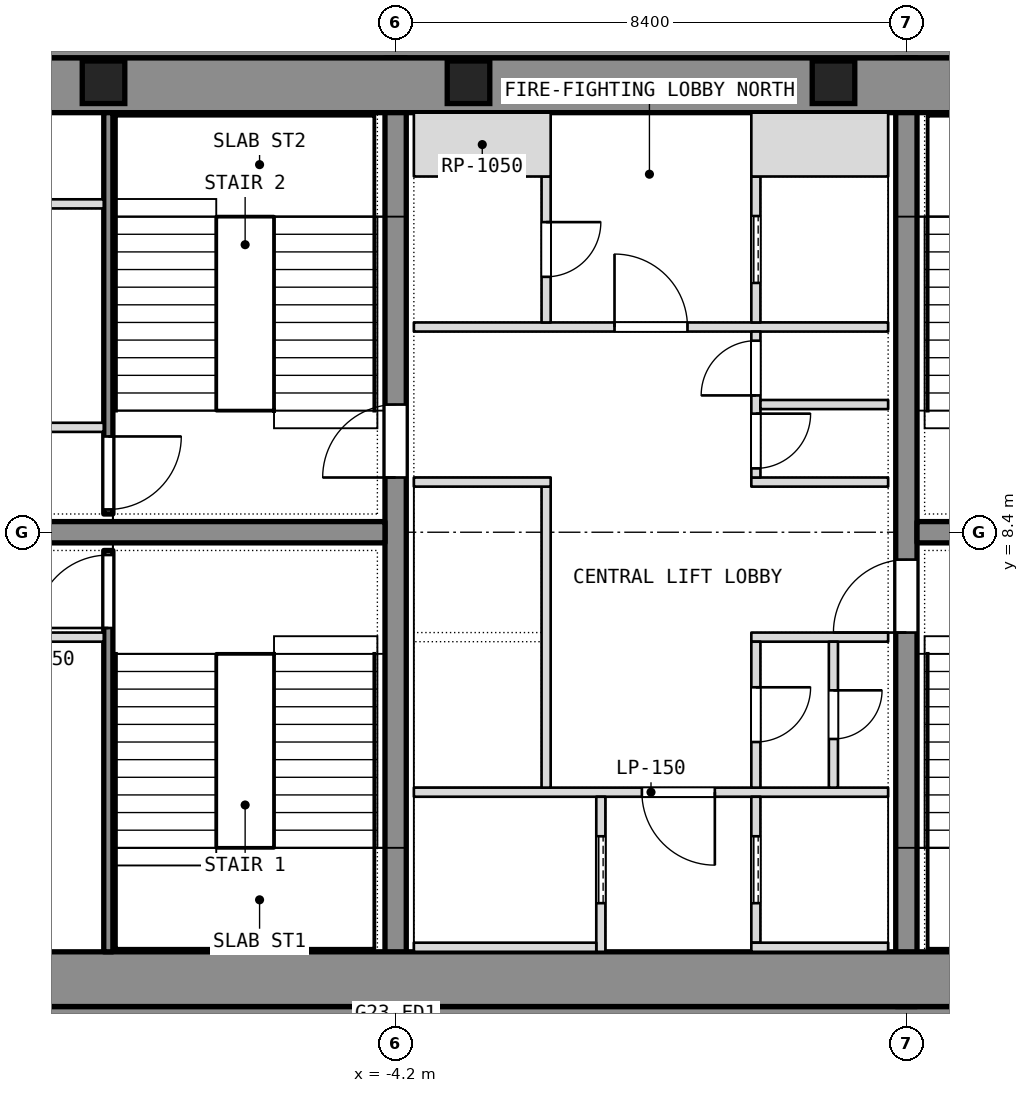
"""IFC4 building model, lengths in metres.
Left out: names, types, materials, properties, quantities, classifications, styles, units other than length and angle.
Written with IfcOpenShell. Run it as: python <this file> out.ifc"""

import sys

from ifc_helpers import new_model, si_unit, direction, frame, frame_2d, origin, origin_2d, place, context, subcontext, project, spatial, rectangle, extrude, element, fill, save


model = new_model("IFC4")
c1 = context("Model", 3, precision=1e-05, world=origin(), true_north=direction((0.0, 1.0)))
c2 = subcontext(c1, "Body", "Model", "MODEL_VIEW")
j1 = project(units=[si_unit("LENGTHUNIT", "METRE"), si_unit("PLANEANGLEUNIT", "RADIAN")], contexts=[c1])
p1 = place(None, origin())
s1 = spatial("IfcSite", under=j1, at=p1, CompositionType="ELEMENT")
p2 = place(p1, origin())
s2 = spatial("IfcBuilding", under=s1, at=p2, CompositionType="ELEMENT")
p3 = place(p2, frame((0.0, 0.0, 274.1)))
s3 = spatial("IfcBuildingStorey", under=s2, at=p3, CompositionType="ELEMENT", Elevation=274.1)
for number, where, z_axis, x_axis in (
    (1, (-11.1, 0.3, 0.0), (0.0, 0.0, 1.0), (1.0, 0.0, 0.0)),
    (2, (-11.1, 16.5, 0.0), (0.0, 0.0, 1.0), (1.0, 0.0, 0.0)),
):
    element("IfcWall", number, at=place(p3, frame(where, z_axis=z_axis, x_axis=x_axis)), inside=s3, PredefinedType="SHEAR", context=c2, shape_type="SweptSolid", body=[
        extrude(rectangle(XDim=22.2, YDim=0.6, at=frame_2d((11.1, 0.0))), origin(), (0.0, 0.0, 1.0), 3.6),
    ])
p4 = place(p3, frame((-4.2, 0.6, 0.0), z_axis=(0.0, 0.0, 1.0), x_axis=(0.0, 1.0, 0.0)))
e3 = element("IfcWall", 3, at=p4, inside=s3, PredefinedType="SHEAR", context=c2, shape_type="SweptSolid", body=[
    extrude(rectangle(XDim=15.6, YDim=0.35, at=frame_2d((7.8, 0.0))), origin(), (0.0, 0.0, 1.0), 3.6),
])
p5 = place(p4, frame((8.7, 0.0, 0.0)))
e4 = element("IfcOpeningElement", 4, at=p5, cuts=e3, PredefinedType="OPENING", context=c2, shape_type="SweptSolid", body=[
    extrude(rectangle(XDim=1.2, YDim=2.1, at=frame_2d((0.6, 1.05))), frame((0.0, 0.175, 0.0), z_axis=(0.0, -1.0, 0.0), x_axis=(1.0, 0.0, 0.0)), (0.0, 0.0, 1.0), 0.35),
])
p6 = place(p3, frame((4.2, 0.6, 0.0), z_axis=(0.0, 0.0, 1.0), x_axis=(0.0, 1.0, 0.0)))
e5 = element("IfcWall", 5, at=p6, inside=s3, PredefinedType="SHEAR", context=c2, shape_type="SweptSolid", body=[
    extrude(rectangle(XDim=15.6, YDim=0.35, at=frame_2d((7.8, 0.0))), origin(), (0.0, 0.0, 1.0), 3.6),
])
p7 = place(p6, frame((6.15, 0.0, 0.0)))
e6 = element("IfcOpeningElement", 6, at=p7, cuts=e5, PredefinedType="OPENING", context=c2, shape_type="SweptSolid", body=[
    extrude(rectangle(XDim=1.2, YDim=2.1, at=frame_2d((0.6, 1.05))), frame((0.0, 0.175, 0.0), z_axis=(0.0, -1.0, 0.0), x_axis=(1.0, 0.0, 0.0)), (0.0, 0.0, 1.0), 0.35),
])
for number, where, z_axis, x_axis in (
    (7, (-11.1, 8.4, 0.0), (0.0, 0.0, 1.0), (1.0, 0.0, 0.0)),
    (8, (4.375, 8.4, 0.0), (0.0, 0.0, 1.0), (1.0, 0.0, 0.0)),
):
    element("IfcWall", number, at=place(p3, frame(where, z_axis=z_axis, x_axis=x_axis)), inside=s3, PredefinedType="SHEAR", context=c2, shape_type="SweptSolid", body=[
        extrude(rectangle(XDim=6.725, YDim=0.35, at=frame_2d((3.363, 0.0))), origin(), (0.0, 0.0, 1.0), 3.6),
    ])
for number, where, z_axis, x_axis in (
    (9, (-9.004, 15.8, 0.0), (0.0, 0.0, 1.0), (1.0, 0.0, 0.0)),
    (10, (-3.001, 15.8, 0.0), (0.0, 0.0, 1.0), (1.0, 0.0, 0.0)),
    (11, (3.001, 15.8, 0.0), (0.0, 0.0, 1.0), (1.0, 0.0, 0.0)),
):
    element("IfcColumn", number, at=place(p3, frame(where, z_axis=z_axis, x_axis=x_axis)), inside=s3, PredefinedType="COLUMN", context=c2, shape_type="SweptSolid", body=[
        extrude(rectangle(XDim=0.7, YDim=0.7, at=origin_2d()), origin(), (0.0, 0.0, 1.0), 3.6),
    ])
for number, where, z_axis, x_axis in (
    (12, (-11.1, 1.05, 0.0), (0.0, 0.0, 1.0), (1.0, 0.0, 0.0)),
    (13, (-11.1, 15.75, 0.0), (0.0, 0.0, 1.0), (1.0, 0.0, 0.0)),
):
    element("IfcWall", number, at=place(p3, frame(where, z_axis=z_axis, x_axis=x_axis)), inside=s3, PredefinedType="PARTITIONING", context=c2, shape_type="SweptSolid", body=[
        extrude(rectangle(XDim=22.2, YDim=0.9, at=frame_2d((11.1, 0.0))), origin(), (0.0, 0.0, 1.0), 3.34),
    ])
p8 = place(p3, frame((-8.925, 1.5, 0.0), z_axis=(0.0, 0.0, 1.0), x_axis=(0.0, 1.0, 0.0)))
e14 = element("IfcWall", 14, at=p8, inside=s3, PredefinedType="SHEAR", context=c2, shape_type="SweptSolid", body=[
    extrude(rectangle(XDim=6.6, YDim=0.15, at=frame_2d((3.3, 0.0))), origin(), (0.0, 0.0, 1.0), 3.34),
])
p9 = place(p8, frame((5.325, 0.0, 0.0)))
e15 = element("IfcOpeningElement", 15, at=p9, cuts=e14, PredefinedType="OPENING", context=c2, shape_type="SweptSolid", body=[
    extrude(rectangle(XDim=1.2, YDim=2.1, at=frame_2d((0.6, 1.05))), frame((0.0, 0.075, 0.0), z_axis=(0.0, -1.0, 0.0), x_axis=(1.0, 0.0, 0.0)), (0.0, 0.0, 1.0), 0.15),
])
p10 = place(p3, frame((-11.1, 6.675, 0.0), z_axis=(0.0, 0.0, 1.0), x_axis=(1.0, 0.0, 0.0)))
e16 = element("IfcWall", 16, at=p10, inside=s3, PredefinedType="PARTITIONING", context=c2, shape_type="SweptSolid", body=[
    extrude(rectangle(XDim=2.1, YDim=0.15, at=frame_2d((1.05, 0.0))), origin(), (0.0, 0.0, 1.0), 3.34),
])
p11 = place(p3, frame((-8.925, 8.7, 0.0), z_axis=(0.0, 0.0, 1.0), x_axis=(0.0, 1.0, 0.0)))
e17 = element("IfcWall", 17, at=p11, inside=s3, PredefinedType="SHEAR", context=c2, shape_type="SweptSolid", body=[
    extrude(rectangle(XDim=6.6, YDim=0.15, at=frame_2d((3.3, 0.0))), origin(), (0.0, 0.0, 1.0), 3.34),
])
p12 = place(p11, frame((0.075, 0.0, 0.0)))
e18 = element("IfcOpeningElement", 18, at=p12, cuts=e17, PredefinedType="OPENING", context=c2, shape_type="SweptSolid", body=[
    extrude(rectangle(XDim=1.2, YDim=2.1, at=frame_2d((0.6, 1.05))), frame((0.0, 0.075, 0.0), z_axis=(0.0, -1.0, 0.0), x_axis=(1.0, 0.0, 0.0)), (0.0, 0.0, 1.0), 0.15),
])
for number, where, z_axis, x_axis in (
    (19, (-11.1, 10.125, 0.0), (0.0, 0.0, 1.0), (1.0, 0.0, 0.0)),
    (20, (-11.1, 13.8, 0.0), (0.0, 0.0, 1.0), (1.0, 0.0, 0.0)),
):
    element("IfcWall", number, at=place(p3, frame(where, z_axis=z_axis, x_axis=x_axis)), inside=s3, PredefinedType="PARTITIONING", context=c2, shape_type="SweptSolid", body=[
        extrude(rectangle(XDim=2.1, YDim=0.15, at=frame_2d((1.05, 0.0))), origin(), (0.0, 0.0, 1.0), 3.34),
    ])
p13 = place(p3, frame((-3.9, 4.125, 0.0), z_axis=(0.0, 0.0, 1.0), x_axis=(1.0, 0.0, 0.0)))
e21 = element("IfcWall", 21, at=p13, inside=s3, PredefinedType="PARTITIONING", context=c2, shape_type="SweptSolid", body=[
    extrude(rectangle(XDim=7.8, YDim=0.15, at=frame_2d((3.9, 0.0))), origin(), (0.0, 0.0, 1.0), 3.34),
])
p14 = place(p13, frame((3.75, 0.0, 0.0)))
e22 = element("IfcOpeningElement", 22, at=p14, cuts=e21, PredefinedType="OPENING", context=c2, shape_type="SweptSolid", body=[
    extrude(rectangle(XDim=1.2, YDim=2.1, at=frame_2d((0.6, 1.05))), frame((0.0, 0.075, 0.0), z_axis=(0.0, -1.0, 0.0), x_axis=(1.0, 0.0, 0.0)), (0.0, 0.0, 1.0), 0.15),
])
p15 = place(p3, frame((-3.9, 11.775, 0.0), z_axis=(0.0, 0.0, 1.0), x_axis=(1.0, 0.0, 0.0)))
e23 = element("IfcWall", 23, at=p15, inside=s3, PredefinedType="PARTITIONING", context=c2, shape_type="SweptSolid", body=[
    extrude(rectangle(XDim=7.8, YDim=0.15, at=frame_2d((3.9, 0.0))), origin(), (0.0, 0.0, 1.0), 3.34),
])
p16 = place(p15, frame((3.3, 0.0, 0.0)))
e24 = element("IfcOpeningElement", 24, at=p16, cuts=e23, PredefinedType="OPENING", context=c2, shape_type="SweptSolid", body=[
    extrude(rectangle(XDim=1.2, YDim=2.1, at=frame_2d((0.6, 1.05))), frame((0.0, 0.075, 0.0), z_axis=(0.0, -1.0, 0.0), x_axis=(1.0, 0.0, 0.0)), (0.0, 0.0, 1.0), 0.15),
])
p17 = place(p3, frame((-0.825, 1.5, 0.0), z_axis=(0.0, 0.0, 1.0), x_axis=(0.0, 1.0, 0.0)))
e25 = element("IfcWall", 25, at=p17, inside=s3, PredefinedType="SHEAR", context=c2, shape_type="SweptSolid", body=[
    extrude(rectangle(XDim=2.55, YDim=0.15, at=frame_2d((1.275, 0.0))), origin(), (0.0, 0.0, 1.0), 3.6),
])
p18 = place(p17, frame((0.8, 0.0, 0.0)))
e26 = element("IfcOpeningElement", 26, at=p18, cuts=e25, PredefinedType="OPENING", context=c2, shape_type="SweptSolid", body=[
    extrude(rectangle(XDim=1.1, YDim=2.1, at=frame_2d((0.55, 1.05))), frame((0.0, 0.075, 0.0), z_axis=(0.0, -1.0, 0.0), x_axis=(1.0, 0.0, 0.0)), (0.0, 0.0, 1.0), 0.15),
])
p19 = place(p3, frame((-3.9, 1.575, 0.0), z_axis=(0.0, 0.0, 1.0), x_axis=(1.0, 0.0, 0.0)))
e27 = element("IfcWall", 27, at=p19, inside=s3, PredefinedType="SHEAR", context=c2, shape_type="SweptSolid", body=[
    extrude(rectangle(XDim=3.0, YDim=0.15, at=frame_2d((1.5, 0.0))), origin(), (0.0, 0.0, 1.0), 3.6),
])
p20 = place(p3, frame((-1.725, 4.2, 0.0), z_axis=(0.0, 0.0, 1.0), x_axis=(0.0, 1.0, 0.0)))
e28 = element("IfcWall", 28, at=p20, inside=s3, PredefinedType="SHEAR", context=c2, shape_type="SweptSolid", body=[
    extrude(rectangle(XDim=4.95, YDim=0.15, at=frame_2d((2.475, 0.0))), origin(), (0.0, 0.0, 1.0), 3.6),
])
p21 = place(p3, frame((-3.9, 9.225, 0.0), z_axis=(0.0, 0.0, 1.0), x_axis=(1.0, 0.0, 0.0)))
e29 = element("IfcWall", 29, at=p21, inside=s3, PredefinedType="SHEAR", context=c2, shape_type="SweptSolid", body=[
    extrude(rectangle(XDim=2.25, YDim=0.15, at=frame_2d((1.125, 0.0))), origin(), (0.0, 0.0, 1.0), 3.6),
])
p22 = place(p3, frame((-1.725, 11.85, 0.0), z_axis=(0.0, 0.0, 1.0), x_axis=(0.0, 1.0, 0.0)))
e30 = element("IfcWall", 30, at=p22, inside=s3, PredefinedType="PARTITIONING", context=c2, shape_type="SweptSolid", body=[
    extrude(rectangle(XDim=2.4, YDim=0.15, at=frame_2d((1.2, 0.0))), origin(), (0.0, 0.0, 1.0), 3.34),
])
p23 = place(p22, frame((0.75, 0.0, 0.0)))
e31 = element("IfcOpeningElement", 31, at=p23, cuts=e30, PredefinedType="OPENING", context=c2, shape_type="SweptSolid", body=[
    extrude(rectangle(XDim=0.9, YDim=2.1, at=frame_2d((0.45, 1.05))), frame((0.0, 0.075, 0.0), z_axis=(0.0, -1.0, 0.0), x_axis=(1.0, 0.0, 0.0)), (0.0, 0.0, 1.0), 0.15),
])
p24 = place(p3, frame((-3.9, 14.775, 0.0), z_axis=(0.0, 0.0, 1.0), x_axis=(1.0, 0.0, 0.0)))
e32 = element("IfcWall", 32, at=p24, inside=s3, PredefinedType="PARTITIONING", context=c2, shape_type="SweptSolid", body=[
    extrude(rectangle(XDim=2.25, YDim=1.05, at=frame_2d((1.125, 0.0))), origin(), (0.0, 0.0, 1.0), 3.34),
])
p25 = place(p3, frame((1.725, 1.65, 0.0), z_axis=(0.0, 0.0, 1.0), x_axis=(0.0, 1.0, 0.0)))
e33 = element("IfcWall", 33, at=p25, inside=s3, PredefinedType="SHEAR", context=c2, shape_type="SweptSolid", body=[
    extrude(rectangle(XDim=2.4, YDim=0.15, at=frame_2d((1.2, 0.0))), origin(), (0.0, 0.0, 1.0), 3.6),
])
p26 = place(p25, frame((0.65, 0.0, 0.0)))
e34 = element("IfcOpeningElement", 34, at=p26, cuts=e33, PredefinedType="OPENING", context=c2, shape_type="SweptSolid", body=[
    extrude(rectangle(XDim=1.1, YDim=2.1, at=frame_2d((0.55, 1.05))), frame((0.0, 0.075, 0.0), z_axis=(0.0, -1.0, 0.0), x_axis=(1.0, 0.0, 0.0)), (0.0, 0.0, 1.0), 0.15),
])
p27 = place(p3, frame((1.65, 1.575, 0.0), z_axis=(0.0, 0.0, 1.0), x_axis=(1.0, 0.0, 0.0)))
e35 = element("IfcWall", 35, at=p27, inside=s3, PredefinedType="SHEAR", context=c2, shape_type="SweptSolid", body=[
    extrude(rectangle(XDim=2.25, YDim=0.15, at=frame_2d((1.125, 0.0))), origin(), (0.0, 0.0, 1.0), 3.6),
])
p28 = place(p3, frame((1.725, 11.85, 0.0), z_axis=(0.0, 0.0, 1.0), x_axis=(0.0, 1.0, 0.0)))
e36 = element("IfcWall", 36, at=p28, inside=s3, PredefinedType="SHEAR", context=c2, shape_type="SweptSolid", body=[
    extrude(rectangle(XDim=2.4, YDim=0.15, at=frame_2d((1.2, 0.0))), origin(), (0.0, 0.0, 1.0), 3.6),
])
p29 = place(p28, frame((0.65, 0.0, 0.0)))
e37 = element("IfcOpeningElement", 37, at=p29, cuts=e36, PredefinedType="OPENING", context=c2, shape_type="SweptSolid", body=[
    extrude(rectangle(XDim=1.1, YDim=2.1, at=frame_2d((0.55, 1.05))), frame((0.0, 0.075, 0.0), z_axis=(0.0, -1.0, 0.0), x_axis=(1.0, 0.0, 0.0)), (0.0, 0.0, 1.0), 0.15),
])
p30 = place(p3, frame((1.65, 14.775, 0.0), z_axis=(0.0, 0.0, 1.0), x_axis=(1.0, 0.0, 0.0)))
e38 = element("IfcWall", 38, at=p30, inside=s3, PredefinedType="SHEAR", context=c2, shape_type="SweptSolid", body=[
    extrude(rectangle(XDim=2.25, YDim=1.05, at=frame_2d((1.125, 0.0))), origin(), (0.0, 0.0, 1.0), 3.6),
])
for number, where, z_axis, x_axis in (
    (39, (1.65, 6.675, 0.0), (0.0, 0.0, 1.0), (1.0, 0.0, 0.0)),
    (40, (1.65, 9.225, 0.0), (0.0, 0.0, 1.0), (1.0, 0.0, 0.0)),
):
    element("IfcWall", number, at=place(p3, frame(where, z_axis=z_axis, x_axis=x_axis)), inside=s3, PredefinedType="PARTITIONING", context=c2, shape_type="SweptSolid", body=[
        extrude(rectangle(XDim=2.25, YDim=0.15, at=frame_2d((1.125, 0.0))), origin(), (0.0, 0.0, 1.0), 3.34),
    ])
p31 = place(p3, frame((1.725, 4.2, 0.0), z_axis=(0.0, 0.0, 1.0), x_axis=(0.0, 1.0, 0.0)))
e41 = element("IfcWall", 41, at=p31, inside=s3, PredefinedType="PARTITIONING", context=c2, shape_type="SweptSolid", body=[
    extrude(rectangle(XDim=2.4, YDim=0.15, at=frame_2d((1.2, 0.0))), origin(), (0.0, 0.0, 1.0), 3.34),
])
p32 = place(p31, frame((0.75, 0.0, 0.0)))
e42 = element("IfcOpeningElement", 42, at=p32, cuts=e41, PredefinedType="OPENING", context=c2, shape_type="SweptSolid", body=[
    extrude(rectangle(XDim=0.9, YDim=2.1, at=frame_2d((0.45, 1.05))), frame((0.0, 0.075, 0.0), z_axis=(0.0, -1.0, 0.0), x_axis=(1.0, 0.0, 0.0)), (0.0, 0.0, 1.0), 0.15),
])
p33 = place(p3, frame((1.725, 9.3, 0.0), z_axis=(0.0, 0.0, 1.0), x_axis=(0.0, 1.0, 0.0)))
e43 = element("IfcWall", 43, at=p33, inside=s3, PredefinedType="PARTITIONING", context=c2, shape_type="SweptSolid", body=[
    extrude(rectangle(XDim=2.4, YDim=0.15, at=frame_2d((1.2, 0.0))), origin(), (0.0, 0.0, 1.0), 3.34),
])
p34 = place(p33, frame((0.15, 0.0, 0.0)))
e44 = element("IfcOpeningElement", 44, at=p34, cuts=e43, PredefinedType="OPENING", context=c2, shape_type="SweptSolid", body=[
    extrude(rectangle(XDim=0.9, YDim=2.1, at=frame_2d((0.45, 1.05))), frame((0.0, 0.075, 0.0), z_axis=(0.0, -1.0, 0.0), x_axis=(1.0, 0.0, 0.0)), (0.0, 0.0, 1.0), 0.15),
])
p35 = place(p33, frame((1.35, 0.0, 0.0)))
e45 = element("IfcOpeningElement", 45, at=p35, cuts=e43, PredefinedType="OPENING", context=c2, shape_type="SweptSolid", body=[
    extrude(rectangle(XDim=0.9, YDim=2.1, at=frame_2d((0.45, 1.05))), frame((0.0, 0.075, 0.0), z_axis=(0.0, -1.0, 0.0), x_axis=(1.0, 0.0, 0.0)), (0.0, 0.0, 1.0), 0.15),
])
p36 = place(p3, frame((3.0, 4.2, 0.0), z_axis=(0.0, 0.0, 1.0), x_axis=(0.0, 1.0, 0.0)))
e46 = element("IfcWall", 46, at=p36, inside=s3, PredefinedType="PARTITIONING", context=c2, shape_type="SweptSolid", body=[
    extrude(rectangle(XDim=2.4, YDim=0.15, at=frame_2d((1.2, 0.0))), origin(), (0.0, 0.0, 1.0), 3.34),
])
p37 = place(p36, frame((0.8, 0.0, 0.0)))
e47 = element("IfcOpeningElement", 47, at=p37, cuts=e46, PredefinedType="OPENING", context=c2, shape_type="SweptSolid", body=[
    extrude(rectangle(XDim=0.8, YDim=2.1, at=frame_2d((0.4, 1.05))), frame((0.0, 0.075, 0.0), z_axis=(0.0, -1.0, 0.0), x_axis=(1.0, 0.0, 0.0)), (0.0, 0.0, 1.0), 0.15),
])
p38 = place(p3, frame((1.8, 10.5, 0.0), z_axis=(0.0, 0.0, 1.0), x_axis=(1.0, 0.0, 0.0)))
e48 = element("IfcWall", 48, at=p38, inside=s3, PredefinedType="PARTITIONING", context=c2, shape_type="SweptSolid", body=[
    extrude(rectangle(XDim=2.1, YDim=0.15, at=frame_2d((1.05, 0.0))), origin(), (0.0, 0.0, 1.0), 3.34),
])
p39 = place(p9, origin())
e49 = element("IfcDoor", 49, at=p39, inside=s3, OperationType="SINGLE_SWING_LEFT", PredefinedType="DOOR", context=c2, shape_type="SweptSolid", body=[
    extrude(rectangle(XDim=1.2, YDim=2.1, at=frame_2d((0.6, 1.05))), frame((0.0, 0.025, 0.0), z_axis=(0.0, -1.0, 0.0), x_axis=(1.0, 0.0, 0.0)), (0.0, 0.0, 1.0), 0.05),
])
fill(e15, e49)
p40 = place(p12, origin())
e50 = element("IfcDoor", 50, at=p40, inside=s3, OperationType="SINGLE_SWING_LEFT", PredefinedType="DOOR", context=c2, shape_type="SweptSolid", body=[
    extrude(rectangle(XDim=1.2, YDim=2.1, at=frame_2d((0.6, 1.05))), frame((0.0, 0.025, 0.0), z_axis=(0.0, -1.0, 0.0), x_axis=(1.0, 0.0, 0.0)), (0.0, 0.0, 1.0), 0.05),
])
fill(e18, e50)
p41 = place(p32, origin())
e51 = element("IfcDoor", 51, at=p41, inside=s3, OperationType="SINGLE_SWING_LEFT", PredefinedType="DOOR", context=c2, shape_type="SweptSolid", body=[
    extrude(rectangle(XDim=0.9, YDim=2.1, at=frame_2d((0.45, 1.05))), frame((0.0, 0.025, 0.0), z_axis=(0.0, -1.0, 0.0), x_axis=(1.0, 0.0, 0.0)), (0.0, 0.0, 1.0), 0.05),
])
fill(e42, e51)
p42 = place(p37, origin())
e52 = element("IfcDoor", 52, at=p42, inside=s3, OperationType="SINGLE_SWING_LEFT", PredefinedType="DOOR", context=c2, shape_type="SweptSolid", body=[
    extrude(rectangle(XDim=0.8, YDim=2.1, at=frame_2d((0.4, 1.05))), frame((0.0, 0.025, 0.0), z_axis=(0.0, -1.0, 0.0), x_axis=(1.0, 0.0, 0.0)), (0.0, 0.0, 1.0), 0.05),
])
fill(e47, e52)
p43 = place(p34, origin())
e53 = element("IfcDoor", 53, at=p43, inside=s3, OperationType="SINGLE_SWING_LEFT", PredefinedType="DOOR", context=c2, shape_type="SweptSolid", body=[
    extrude(rectangle(XDim=0.9, YDim=2.1, at=frame_2d((0.45, 1.05))), frame((0.0, 0.025, 0.0), z_axis=(0.0, -1.0, 0.0), x_axis=(1.0, 0.0, 0.0)), (0.0, 0.0, 1.0), 0.05),
])
fill(e44, e53)
p44 = place(p35, origin())
e54 = element("IfcDoor", 54, at=p44, inside=s3, OperationType="SINGLE_SWING_LEFT", PredefinedType="DOOR", context=c2, shape_type="SweptSolid", body=[
    extrude(rectangle(XDim=0.9, YDim=2.1, at=frame_2d((0.45, 1.05))), frame((0.0, 0.025, 0.0), z_axis=(0.0, -1.0, 0.0), x_axis=(1.0, 0.0, 0.0)), (0.0, 0.0, 1.0), 0.05),
])
fill(e45, e54)
p45 = place(p18, origin())
e55 = element("IfcDoor", 55, at=p45, inside=s3, OperationType="SLIDING_TO_LEFT", PredefinedType="DOOR", context=c2, shape_type="SweptSolid", body=[
    extrude(rectangle(XDim=1.1, YDim=2.1, at=frame_2d((0.55, 1.05))), frame((0.0, 0.025, 0.0), z_axis=(0.0, -1.0, 0.0), x_axis=(1.0, 0.0, 0.0)), (0.0, 0.0, 1.0), 0.05),
])
fill(e26, e55)
p46 = place(p26, origin())
e56 = element("IfcDoor", 56, at=p46, inside=s3, OperationType="SLIDING_TO_LEFT", PredefinedType="DOOR", context=c2, shape_type="SweptSolid", body=[
    extrude(rectangle(XDim=1.1, YDim=2.1, at=frame_2d((0.55, 1.05))), frame((0.0, 0.025, 0.0), z_axis=(0.0, -1.0, 0.0), x_axis=(1.0, 0.0, 0.0)), (0.0, 0.0, 1.0), 0.05),
])
fill(e34, e56)
p47 = place(p29, origin())
e57 = element("IfcDoor", 57, at=p47, inside=s3, OperationType="SLIDING_TO_LEFT", PredefinedType="DOOR", context=c2, shape_type="SweptSolid", body=[
    extrude(rectangle(XDim=1.1, YDim=2.1, at=frame_2d((0.55, 1.05))), frame((0.0, 0.025, 0.0), z_axis=(0.0, -1.0, 0.0), x_axis=(1.0, 0.0, 0.0)), (0.0, 0.0, 1.0), 0.05),
])
fill(e37, e57)
p48 = place(p14, origin())
e58 = element("IfcDoor", 58, at=p48, inside=s3, OperationType="SINGLE_SWING_LEFT", PredefinedType="DOOR", context=c2, shape_type="SweptSolid", body=[
    extrude(rectangle(XDim=1.2, YDim=2.1, at=frame_2d((0.6, 1.05))), frame((0.0, 0.025, 0.0), z_axis=(0.0, -1.0, 0.0), x_axis=(1.0, 0.0, 0.0)), (0.0, 0.0, 1.0), 0.05),
])
fill(e22, e58)
p49 = place(p16, origin())
e59 = element("IfcDoor", 59, at=p49, inside=s3, OperationType="SINGLE_SWING_LEFT", PredefinedType="DOOR", context=c2, shape_type="SweptSolid", body=[
    extrude(rectangle(XDim=1.2, YDim=2.1, at=frame_2d((0.6, 1.05))), frame((0.0, 0.025, 0.0), z_axis=(0.0, -1.0, 0.0), x_axis=(1.0, 0.0, 0.0)), (0.0, 0.0, 1.0), 0.05),
])
fill(e24, e59)
p50 = place(p23, origin())
e60 = element("IfcDoor", 60, at=p50, inside=s3, OperationType="SINGLE_SWING_LEFT", PredefinedType="DOOR", context=c2, shape_type="SweptSolid", body=[
    extrude(rectangle(XDim=0.9, YDim=2.1, at=frame_2d((0.45, 1.05))), frame((0.0, 0.025, 0.0), z_axis=(0.0, -1.0, 0.0), x_axis=(1.0, 0.0, 0.0)), (0.0, 0.0, 1.0), 0.05),
])
fill(e31, e60)
p51 = place(p5, origin())
e61 = element("IfcDoor", 61, at=p51, inside=s3, OperationType="SINGLE_SWING_LEFT", PredefinedType="DOOR", context=c2, shape_type="SweptSolid", body=[
    extrude(rectangle(XDim=1.2, YDim=2.1, at=frame_2d((0.6, 1.05))), frame((0.0, 0.025, 0.0), z_axis=(0.0, -1.0, 0.0), x_axis=(1.0, 0.0, 0.0)), (0.0, 0.0, 1.0), 0.05),
])
fill(e4, e61)
p52 = place(p7, origin())
e62 = element("IfcDoor", 62, at=p52, inside=s3, OperationType="SINGLE_SWING_LEFT", PredefinedType="DOOR", context=c2, shape_type="SweptSolid", body=[
    extrude(rectangle(XDim=1.2, YDim=2.1, at=frame_2d((0.6, 1.05))), frame((0.0, 0.025, 0.0), z_axis=(0.0, -1.0, 0.0), x_axis=(1.0, 0.0, 0.0)), (0.0, 0.0, 1.0), 0.05),
])
fill(e6, e62)
save(model, sys.argv[1])
